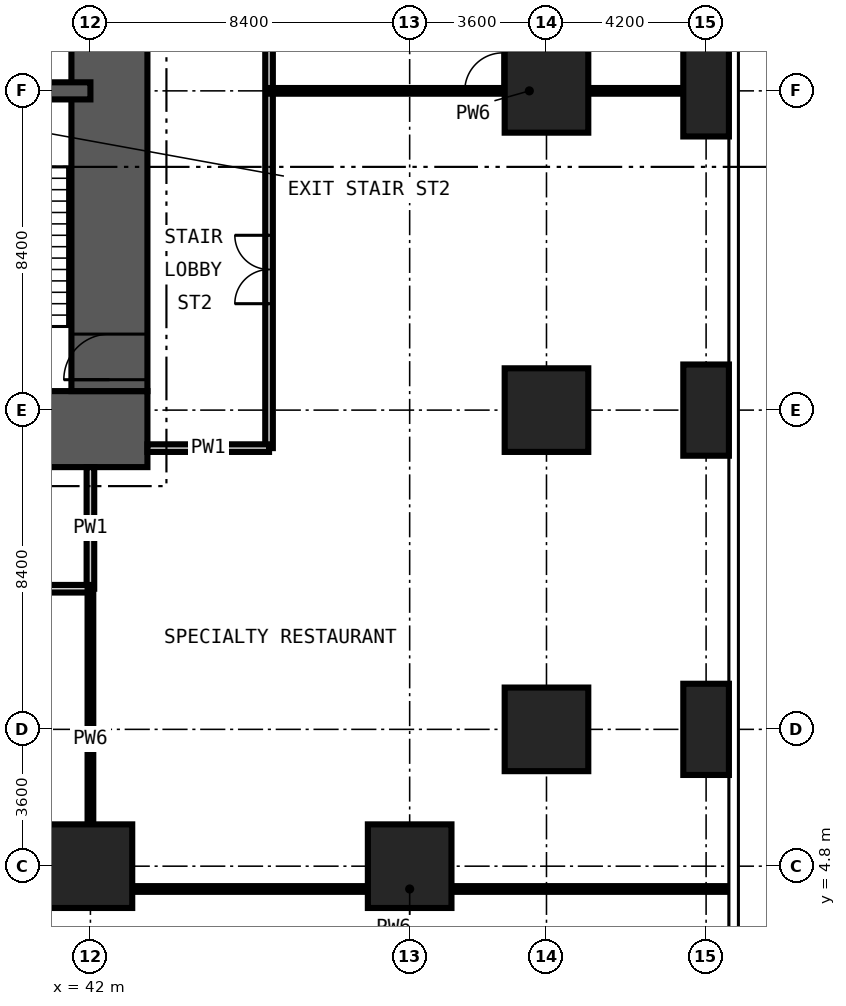
"""IFC4 building model, lengths in metres.
Left out: names, types, materials, properties, quantities, classifications, styles, units other than length and angle.
Written with IfcOpenShell. Run it as: python <this file> out.ifc"""

import sys

from ifc_helpers import new_model, si_unit, direction, frame, frame_2d, origin, origin_2d, place, context, subcontext, project, spatial, rectangle, extrude, element, fill, save


model = new_model("IFC4")
c1 = context("Model", 3, precision=1e-05, world=origin(), true_north=direction((0.0, 1.0)))
c2 = subcontext(c1, "Body", "Model", "MODEL_VIEW")
j1 = project(units=[si_unit("LENGTHUNIT", "METRE"), si_unit("PLANEANGLEUNIT", "RADIAN")], contexts=[c1])
p1 = place(None, origin())
s1 = spatial("IfcSite", under=j1, at=p1, CompositionType="ELEMENT")
p2 = place(p1, origin())
s2 = spatial("IfcBuilding", under=s1, at=p2, CompositionType="ELEMENT")
p3 = place(p2, frame((0.0, 0.0, 17.0)))
s3 = spatial("IfcBuildingStorey", under=s2, at=p3, CompositionType="ELEMENT", Elevation=17.0)
for number, where, z_axis, x_axis in (
    (1, (42.0, 4.8, -0.3), (0.0, 0.0, 1.0), (1.0, 0.0, 0.0)),
    (2, (50.4, 4.8, -0.3), (0.0, 0.0, 1.0), (1.0, 0.0, 0.0)),
    (3, (54.0, 8.4, -0.3), (0.0, 0.0, 1.0), (1.0, 0.0, 0.0)),
    (4, (54.0, 16.8, -0.3), (0.0, 0.0, 1.0), (1.0, 0.0, 0.0)),
    (5, (54.0, 25.2, -0.3), (0.0, 0.0, 1.0), (1.0, 0.0, 0.0)),
):
    element("IfcColumn", number, at=place(p3, frame(where, z_axis=z_axis, x_axis=x_axis)), inside=s3, PredefinedType="COLUMN", context=c2, shape_type="SweptSolid", body=[
        extrude(rectangle(XDim=2.2, YDim=2.2, at=origin_2d()), origin(), (0.0, 0.0, 1.0), 4.95),
    ])
for number, where, z_axis, x_axis in (
    (6, (58.2, 8.4, -0.3), (0.0, 0.0, 1.0), (1.0, 0.0, 0.0)),
    (7, (58.2, 16.8, -0.3), (0.0, 0.0, 1.0), (1.0, 0.0, 0.0)),
    (8, (58.2, 25.2, -0.3), (0.0, 0.0, 1.0), (1.0, 0.0, 0.0)),
):
    element("IfcColumn", number, at=place(p3, frame(where, z_axis=z_axis, x_axis=x_axis)), inside=s3, PredefinedType="COLUMN", context=c2, shape_type="SweptSolid", body=[
        extrude(rectangle(XDim=1.2, YDim=2.4, at=origin_2d()), origin(), (0.0, 0.0, 1.0), 4.95),
    ])
p4 = place(p3, frame((15.3, 16.3, -0.3), z_axis=(0.0, 0.0, 1.0), x_axis=(1.0, 0.0, 0.0)))
e9 = element("IfcWall", 9, at=p4, inside=s3, PredefinedType="SHEAR", context=c2, shape_type="SweptSolid", body=[
    extrude(rectangle(XDim=28.2, YDim=2.0, at=frame_2d((14.1, 0.0))), origin(), (0.0, 0.0, 1.0), 4.95),
])
p5 = place(p4, frame((13.6, 0.0, 0.3)))
e10 = element("IfcOpeningElement", 10, at=p5, cuts=e9, PredefinedType="OPENING", context=c2, shape_type="SweptSolid", body=[
    extrude(rectangle(XDim=1.0, YDim=2.1, at=frame_2d((0.5, 1.05))), frame((0.0, 1.01, 0.0), z_axis=(0.0, -1.0, 0.0), x_axis=(1.0, 0.0, 0.0)), (0.0, 0.0, 1.0), 2.02),
])
p6 = place(p4, frame((19.9, 0.0, 0.3)))
e11 = element("IfcOpeningElement", 11, at=p6, cuts=e9, PredefinedType="OPENING", context=c2, shape_type="SweptSolid", body=[
    extrude(rectangle(XDim=1.0, YDim=2.1, at=frame_2d((0.5, 1.05))), frame((0.0, 1.01, 0.0), z_axis=(0.0, -1.0, 0.0), x_axis=(1.0, 0.0, 0.0)), (0.0, 0.0, 1.0), 2.02),
])
p7 = place(p3, frame((42.5, 17.3, -0.3), z_axis=(0.0, 0.0, 1.0), x_axis=(0.0, 1.0, 0.0)))
e12 = element("IfcWall", 12, at=p7, inside=s3, PredefinedType="SHEAR", context=c2, shape_type="SweptSolid", body=[
    extrude(rectangle(XDim=24.2, YDim=2.0, at=frame_2d((12.1, 0.0))), origin(), (0.0, 0.0, 1.0), 4.95),
])
p8 = place(p7, frame((0.3, 0.0, 0.3)))
e13 = element("IfcOpeningElement", 13, at=p8, cuts=e12, PredefinedType="OPENING", context=c2, shape_type="SweptSolid", body=[
    extrude(rectangle(XDim=1.2, YDim=2.2, at=frame_2d((0.6, 1.1))), frame((0.0, 1.01, 0.0), z_axis=(0.0, -1.0, 0.0), x_axis=(1.0, 0.0, 0.0)), (0.0, 0.0, 1.0), 2.02),
])
p9 = place(p7, frame((11.6, 0.0, 0.3)))
e14 = element("IfcOpeningElement", 14, at=p9, cuts=e12, PredefinedType="OPENING", context=c2, shape_type="SweptSolid", body=[
    extrude(rectangle(XDim=1.0, YDim=2.1, at=frame_2d((0.5, 1.05))), frame((0.0, 1.01, 0.0), z_axis=(0.0, -1.0, 0.0), x_axis=(1.0, 0.0, 0.0)), (0.0, 0.0, 1.0), 2.02),
])
p10 = place(p7, frame((20.0, 0.0, 0.3)))
e15 = element("IfcOpeningElement", 15, at=p10, cuts=e12, PredefinedType="OPENING", context=c2, shape_type="SweptSolid", body=[
    extrude(rectangle(XDim=1.0, YDim=2.1, at=frame_2d((0.5, 1.05))), frame((0.0, 1.01, 0.0), z_axis=(0.0, -1.0, 0.0), x_axis=(1.0, 0.0, 0.0)), (0.0, 0.0, 1.0), 2.02),
])
p11 = place(p3, frame((16.8, 25.2, -0.3), z_axis=(0.0, 0.0, 1.0), x_axis=(1.0, 0.0, 0.0)))
e16 = element("IfcWall", 16, at=p11, inside=s3, PredefinedType="SHEAR", context=c2, shape_type="SweptSolid", body=[
    extrude(rectangle(XDim=25.2, YDim=0.45, at=frame_2d((12.6, 0.0))), origin(), (0.0, 0.0, 1.0), 4.95),
])
p12 = place(p3, frame((42.0, 12.1, 0.0), z_axis=(0.0, 0.0, 1.0), x_axis=(0.0, 1.0, 0.0)))
e17 = element("IfcWall", 17, at=p12, inside=s3, PredefinedType="PARTITIONING", context=c2, shape_type="SweptSolid", body=[
    extrude(rectangle(XDim=3.2, YDim=0.2, at=frame_2d((1.6, 0.0))), origin(), (0.0, 0.0, 1.0), 4.65),
])
p13 = place(p3, frame((46.7, 15.8, 0.0), z_axis=(0.0, 0.0, 1.0), x_axis=(0.0, 1.0, 0.0)))
e18 = element("IfcWall", 18, at=p13, inside=s3, PredefinedType="PARTITIONING", context=c2, shape_type="SweptSolid", body=[
    extrude(rectangle(XDim=26.2, YDim=0.2, at=frame_2d((13.1, 0.0))), origin(), (0.0, 0.0, 1.0), 4.65),
])
p14 = place(p13, frame((3.8, 0.0, 0.0)))
e19 = element("IfcOpeningElement", 19, at=p14, cuts=e18, PredefinedType="OPENING", context=c2, shape_type="SweptSolid", body=[
    extrude(rectangle(XDim=1.8, YDim=2.4, at=frame_2d((0.9, 1.2))), frame((0.0, 0.11, 0.0), z_axis=(0.0, -1.0, 0.0), x_axis=(1.0, 0.0, 0.0)), (0.0, 0.0, 1.0), 0.22),
])
p15 = place(p13, frame((17.3, 0.0, 0.0)))
e20 = element("IfcOpeningElement", 20, at=p15, cuts=e18, PredefinedType="OPENING", context=c2, shape_type="SweptSolid", body=[
    extrude(rectangle(XDim=1.0, YDim=2.1, at=frame_2d((0.5, 1.05))), frame((0.0, 0.11, 0.0), z_axis=(0.0, -1.0, 0.0), x_axis=(1.0, 0.0, 0.0)), (0.0, 0.0, 1.0), 0.22),
])
p16 = place(p3, frame((34.8, 12.1, 0.0), z_axis=(0.0, 0.0, 1.0), x_axis=(1.0, 0.0, 0.0)))
e21 = element("IfcWall", 21, at=p16, inside=s3, PredefinedType="PARTITIONING", context=c2, shape_type="SweptSolid", body=[
    extrude(rectangle(XDim=7.2, YDim=0.2, at=frame_2d((3.6, 0.0))), origin(), (0.0, 0.0, 1.0), 4.65),
])
p17 = place(p3, frame((43.5, 15.8, 0.0), z_axis=(0.0, 0.0, 1.0), x_axis=(1.0, 0.0, 0.0)))
e22 = element("IfcWall", 22, at=p17, inside=s3, PredefinedType="PARTITIONING", context=c2, shape_type="SweptSolid", body=[
    extrude(rectangle(XDim=3.2, YDim=0.2, at=frame_2d((1.6, 0.0))), origin(), (0.0, 0.0, 1.0), 4.65),
])
p18 = place(p3, frame((42.0, 4.2, 0.0), z_axis=(0.0, 0.0, 1.0), x_axis=(0.0, 1.0, 0.0)))
e23 = element("IfcWall", 23, at=p18, inside=s3, PredefinedType="PARTITIONING", context=c2, shape_type="SweptSolid", body=[
    extrude(rectangle(XDim=7.9, YDim=0.15, at=frame_2d((3.95, 0.0))), origin(), (0.0, 0.0, 1.0), 4.65),
])
p19 = place(p3, frame((42.0, 4.2, 0.0), z_axis=(0.0, 0.0, 1.0), x_axis=(1.0, 0.0, 0.0)))
e24 = element("IfcWall", 24, at=p19, inside=s3, PredefinedType="PARTITIONING", context=c2, shape_type="SweptSolid", body=[
    extrude(rectangle(XDim=16.8, YDim=0.15, at=frame_2d((8.4, 0.0))), origin(), (0.0, 0.0, 1.0), 4.65),
])
p20 = place(p3, frame((46.7, 25.2, 0.0), z_axis=(0.0, 0.0, 1.0), x_axis=(1.0, 0.0, 0.0)))
e25 = element("IfcWall", 25, at=p20, inside=s3, PredefinedType="PARTITIONING", context=c2, shape_type="SweptSolid", body=[
    extrude(rectangle(XDim=12.1, YDim=0.15, at=frame_2d((6.05, 0.0))), origin(), (0.0, 0.0, 1.0), 4.65),
])
p21 = place(p20, frame((5.15, 0.0, 0.0)))
e26 = element("IfcOpeningElement", 26, at=p21, cuts=e25, PredefinedType="OPENING", context=c2, shape_type="SweptSolid", body=[
    extrude(rectangle(XDim=1.0, YDim=2.1, at=frame_2d((0.5, 1.05))), frame((0.0, 0.085, 0.0), z_axis=(0.0, -1.0, 0.0), x_axis=(1.0, 0.0, 0.0)), (0.0, 0.0, 1.0), 0.17),
])
p22 = place(p8, origin())
e27 = element("IfcDoor", 27, at=p22, inside=s3, OperationType="SINGLE_SWING_LEFT", PredefinedType="DOOR", context=c2, shape_type="SweptSolid", body=[
    extrude(rectangle(XDim=1.2, YDim=2.2, at=frame_2d((0.6, 1.1))), frame((0.0, 0.025, 0.0), z_axis=(0.0, -1.0, 0.0), x_axis=(1.0, 0.0, 0.0)), (0.0, 0.0, 1.0), 0.05),
])
fill(e13, e27)
p23 = place(p14, origin())
e28 = element("IfcDoor", 28, at=p23, inside=s3, OperationType="DOUBLE_DOOR_DOUBLE_SWING", PredefinedType="DOOR", context=c2, shape_type="SweptSolid", body=[
    extrude(rectangle(XDim=1.8, YDim=2.4, at=frame_2d((0.9, 1.2))), frame((0.0, 0.025, 0.0), z_axis=(0.0, -1.0, 0.0), x_axis=(1.0, 0.0, 0.0)), (0.0, 0.0, 1.0), 0.05),
])
fill(e19, e28)
p24 = place(p21, origin())
e29 = element("IfcDoor", 29, at=p24, inside=s3, OperationType="SINGLE_SWING_RIGHT", PredefinedType="DOOR", context=c2, shape_type="SweptSolid", body=[
    extrude(rectangle(XDim=1.0, YDim=2.1, at=frame_2d((0.5, 1.05))), frame((0.0, 0.025, 0.0), z_axis=(0.0, -1.0, 0.0), x_axis=(1.0, 0.0, 0.0)), (0.0, 0.0, 1.0), 0.05),
])
fill(e26, e29)
save(model, sys.argv[1])
